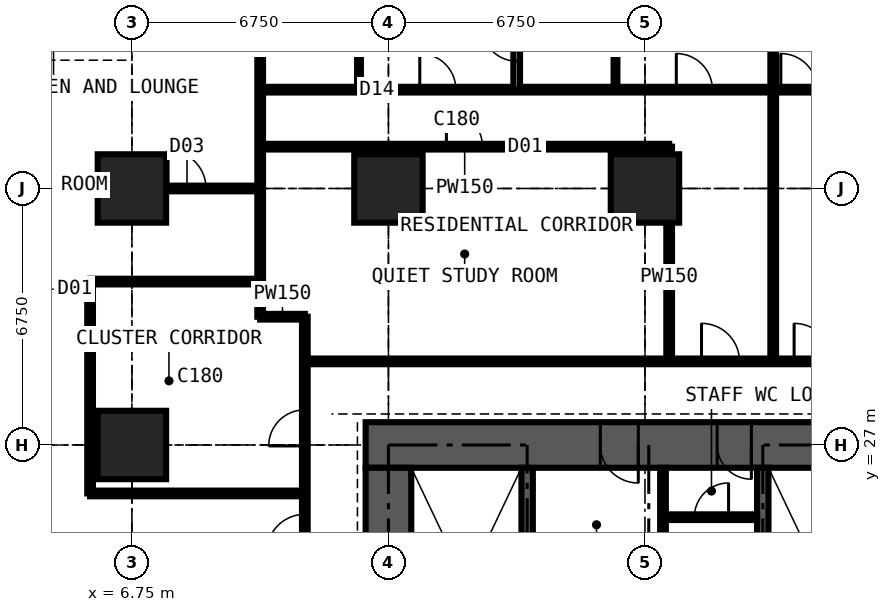
"""IFC4 building model, lengths in metres.
Left out: names, types, materials, properties, quantities, classifications, styles, units other than length and angle.
Written with IfcOpenShell. Run it as: python <this file> out.ifc"""

import sys

from ifc_helpers import new_model, si_unit, direction, frame, frame_2d, origin, origin_2d, place, context, subcontext, project, spatial, rectangle, extrude, element, fill, save


model = new_model("IFC4")
c1 = context("Model", 3, precision=1e-05, world=origin(), true_north=direction((0.0, 1.0)))
c2 = subcontext(c1, "Body", "Model", "MODEL_VIEW")
j1 = project(units=[si_unit("LENGTHUNIT", "METRE"), si_unit("PLANEANGLEUNIT", "RADIAN")], contexts=[c1])
p1 = place(None, origin())
s1 = spatial("IfcSite", under=j1, at=p1, CompositionType="ELEMENT")
p2 = place(p1, origin())
s2 = spatial("IfcBuilding", under=s1, at=p2, CompositionType="ELEMENT")
p3 = place(p2, frame((0.0, 0.0, 68.4)))
s3 = spatial("IfcBuildingStorey", under=s2, at=p3, CompositionType="ELEMENT", Elevation=68.4)
for number, where, z_axis, x_axis in (
    (1, (6.75, 27.0, 0.0), (0.0, 0.0, 1.0), (1.0, 0.0, 0.0)),
    (2, (6.75, 33.75, 0.0), (0.0, 0.0, 1.0), (1.0, 0.0, 0.0)),
    (3, (13.5, 33.75, 0.0), (0.0, 0.0, 1.0), (1.0, 0.0, 0.0)),
    (4, (20.25, 33.75, 0.0), (0.0, 0.0, 1.0), (1.0, 0.0, 0.0)),
):
    element("IfcColumn", number, at=place(p3, frame(where, z_axis=z_axis, x_axis=x_axis)), inside=s3, PredefinedType="COLUMN", context=c2, shape_type="SweptSolid", body=[
        extrude(rectangle(XDim=1.8, YDim=1.8, at=origin_2d()), origin(), (0.0, 0.0, 1.0), 3.6),
    ])
p4 = place(p3, frame((27.6, 27.0, 0.0), z_axis=(0.0, 0.0, 1.0), x_axis=(-1.0, 0.0, 0.0)))
e5 = element("IfcWall", 5, at=p4, inside=s3, PredefinedType="SHEAR", context=c2, shape_type="SweptSolid", body=[
    extrude(rectangle(XDim=14.7, YDim=1.2, at=frame_2d((7.35, 0.0))), origin(), (0.0, 0.0, 1.0), 3.6),
])
p5 = place(p4, frame((4.55, 0.0, 0.0)))
e6 = element("IfcOpeningElement", 6, at=p5, cuts=e5, PredefinedType="OPENING", context=c2, shape_type="SweptSolid", body=[
    extrude(rectangle(XDim=0.9, YDim=2.2, at=frame_2d((0.45, 1.1))), frame((0.0, 0.61, 0.0), z_axis=(0.0, -1.0, 0.0), x_axis=(1.0, 0.0, 0.0)), (0.0, 0.0, 1.0), 1.22),
])
p6 = place(p4, frame((7.525, 0.0, 0.0)))
e7 = element("IfcOpeningElement", 7, at=p6, cuts=e5, PredefinedType="OPENING", context=c2, shape_type="SweptSolid", body=[
    extrude(rectangle(XDim=1.0, YDim=2.2, at=frame_2d((0.5, 1.1))), frame((0.0, 0.61, 0.0), z_axis=(0.0, -1.0, 0.0), x_axis=(1.0, 0.0, 0.0)), (0.0, 0.0, 1.0), 1.22),
])
p7 = place(p3, frame((13.5, 26.4, 0.0), z_axis=(0.0, 0.0, 1.0), x_axis=(0.0, -1.0, 0.0)))
e8 = element("IfcWall", 8, at=p7, inside=s3, PredefinedType="SHEAR", context=c2, shape_type="SweptSolid", body=[
    extrude(rectangle(XDim=12.3, YDim=1.2, at=frame_2d((6.15, 0.0))), origin(), (0.0, 0.0, 1.0), 3.6),
])
p8 = place(p7, frame((7.45, 0.0, 0.0)))
e9 = element("IfcOpeningElement", 9, at=p8, cuts=e8, PredefinedType="OPENING", context=c2, shape_type="SweptSolid", body=[
    extrude(rectangle(XDim=1.2, YDim=2.2, at=frame_2d((0.6, 1.1))), frame((0.0, 0.61, 0.0), z_axis=(0.0, -1.0, 0.0), x_axis=(1.0, 0.0, 0.0)), (0.0, 0.0, 1.0), 1.22),
])
for number, where, z_axis, x_axis in (
    (10, (17.15, 20.3, 0.0), (0.0, 0.0, 1.0), (0.0, 1.0, 0.0)),
    (11, (23.35, 20.3, 0.0), (0.0, 0.0, 1.0), (0.0, 1.0, 0.0)),
):
    element("IfcWall", number, at=place(p3, frame(where, z_axis=z_axis, x_axis=x_axis)), inside=s3, PredefinedType="SHEAR", context=c2, shape_type="SweptSolid", body=[
        extrude(rectangle(XDim=6.1, YDim=0.3, at=frame_2d((3.05, 0.0))), origin(), (0.0, 0.0, 1.0), 3.6),
    ])
p9 = place(p3, frame((20.725, 23.4, 0.0), z_axis=(0.0, 0.0, 1.0), x_axis=(0.0, 1.0, 0.0)))
e12 = element("IfcWall", 12, at=p9, inside=s3, PredefinedType="PARTITIONING", context=c2, shape_type="SweptSolid", body=[
    extrude(rectangle(XDim=3.0, YDim=0.15, at=frame_2d((1.5, 0.0))), origin(), (0.0, 0.0, 1.0), 3.375),
])
p10 = place(p3, frame((20.8, 25.1, 0.0), z_axis=(0.0, 0.0, 1.0), x_axis=(1.0, 0.0, 0.0)))
e13 = element("IfcWall", 13, at=p10, inside=s3, PredefinedType="PARTITIONING", context=c2, shape_type="SweptSolid", body=[
    extrude(rectangle(XDim=2.4, YDim=0.15, at=frame_2d((1.2, 0.0))), origin(), (0.0, 0.0, 1.0), 3.375),
])
p11 = place(p10, frame((0.75, 0.0, 0.0)))
e14 = element("IfcOpeningElement", 14, at=p11, cuts=e13, PredefinedType="OPENING", context=c2, shape_type="SweptSolid", body=[
    extrude(rectangle(XDim=0.9, YDim=2.2, at=frame_2d((0.45, 1.1))), frame((0.0, 0.085, 0.0), z_axis=(0.0, -1.0, 0.0), x_axis=(1.0, 0.0, 0.0)), (0.0, 0.0, 1.0), 0.17),
])
p12 = place(p3, frame((-0.734, 33.75, 0.0), z_axis=(0.0, 0.0, 1.0), x_axis=(1.0, 0.0, 0.0)))
e15 = element("IfcWall", 15, at=p12, inside=s3, PredefinedType="PARTITIONING", context=c2, shape_type="SweptSolid", body=[
    extrude(rectangle(XDim=10.859, YDim=0.15, at=frame_2d((5.429, 0.0))), origin(), (0.0, 0.0, 1.0), 2.877),
])
p13 = place(p12, frame((8.434, 0.0, 0.0)))
e16 = element("IfcOpeningElement", 16, at=p13, cuts=e15, PredefinedType="OPENING", context=c2, shape_type="SweptSolid", body=[
    extrude(rectangle(XDim=1.0, YDim=2.2, at=frame_2d((0.5, 1.1))), frame((0.0, 0.085, 0.0), z_axis=(0.0, -1.0, 0.0), x_axis=(1.0, 0.0, 0.0)), (0.0, 0.0, 1.0), 0.17),
])
p14 = place(p3, frame((5.65, 25.725, 0.0), z_axis=(0.0, 0.0, 1.0), x_axis=(0.0, 1.0, 0.0)))
e17 = element("IfcWall", 17, at=p14, inside=s3, PredefinedType="PARTITIONING", context=c2, shape_type="SweptSolid", body=[
    extrude(rectangle(XDim=5.575, YDim=0.15, at=frame_2d((2.788, 0.0))), origin(), (0.0, 0.0, 1.0), 3.375),
])
p15 = place(p3, frame((5.65, 25.725, 0.0), z_axis=(0.0, 0.0, 1.0), x_axis=(1.0, 0.0, 0.0)))
e18 = element("IfcWall", 18, at=p15, inside=s3, PredefinedType="PARTITIONING", context=c2, shape_type="SweptSolid", body=[
    extrude(rectangle(XDim=5.65, YDim=0.15, at=frame_2d((2.825, 0.0))), origin(), (0.0, 0.0, 1.0), 3.375),
])
p16 = place(p3, frame((5.65, 31.3, 0.0), z_axis=(0.0, 0.0, 1.0), x_axis=(1.0, 0.0, 0.0)))
e19 = element("IfcWall", 19, at=p16, inside=s3, PredefinedType="PARTITIONING", context=c2, shape_type="SweptSolid", body=[
    extrude(rectangle(XDim=4.475, YDim=0.15, at=frame_2d((2.238, 0.0))), origin(), (0.0, 0.0, 1.0), 3.375),
])
p17 = place(p3, frame((10.125, 30.375, 0.0), z_axis=(0.0, 0.0, 1.0), x_axis=(0.0, 1.0, 0.0)))
e20 = element("IfcWall", 20, at=p17, inside=s3, PredefinedType="PARTITIONING", context=c2, shape_type="SweptSolid", body=[
    extrude(rectangle(XDim=10.859, YDim=0.15, at=frame_2d((5.429, 0.0))), origin(), (0.0, 0.0, 1.0), 3.375),
])
p18 = place(p3, frame((10.125, 30.375, 0.0), z_axis=(0.0, 0.0, 1.0), x_axis=(1.0, 0.0, 0.0)))
e21 = element("IfcWall", 21, at=p18, inside=s3, PredefinedType="PARTITIONING", context=c2, shape_type="SweptSolid", body=[
    extrude(rectangle(XDim=1.175, YDim=0.15, at=frame_2d((0.587, 0.0))), origin(), (0.0, 0.0, 1.0), 3.375),
])
p19 = place(p3, frame((10.125, 34.85, 0.0), z_axis=(0.0, 0.0, 1.0), x_axis=(1.0, 0.0, 0.0)))
e22 = element("IfcWall", 22, at=p19, inside=s3, PredefinedType="PARTITIONING", context=c2, shape_type="SweptSolid", body=[
    extrude(rectangle(XDim=10.762, YDim=0.15, at=frame_2d((5.381, 0.0))), origin(), (0.0, 0.0, 1.0), 3.375),
])
p20 = place(p19, frame((4.9, 0.0, 0.0)))
e23 = element("IfcOpeningElement", 23, at=p20, cuts=e22, PredefinedType="OPENING", context=c2, shape_type="SweptSolid", body=[
    extrude(rectangle(XDim=0.95, YDim=2.2, at=frame_2d((0.475, 1.1))), frame((0.0, 0.085, 0.0), z_axis=(0.0, -1.0, 0.0), x_axis=(1.0, 0.0, 0.0)), (0.0, 0.0, 1.0), 0.17),
])
p21 = place(p3, frame((10.125, 36.35, 0.0), z_axis=(0.0, 0.0, 1.0), x_axis=(1.0, 0.0, 0.0)))
e24 = element("IfcWall", 24, at=p21, inside=s3, PredefinedType="PARTITIONING", context=c2, shape_type="SweptSolid", body=[
    extrude(rectangle(XDim=23.625, YDim=0.15, at=frame_2d((11.812, 0.0))), origin(), (0.0, 0.0, 1.0), 3.375),
])
p22 = place(p21, frame((21.45, 0.0, 0.0)))
e25 = element("IfcOpeningElement", 25, at=p22, cuts=e24, PredefinedType="OPENING", context=c2, shape_type="SweptSolid", body=[
    extrude(rectangle(XDim=1.0, YDim=2.2, at=frame_2d((0.5, 1.1))), frame((0.0, 0.085, 0.0), z_axis=(0.0, -1.0, 0.0), x_axis=(1.0, 0.0, 0.0)), (0.0, 0.0, 1.0), 0.17),
])
p23 = place(p21, frame((17.125, 0.0, 0.0)))
e26 = element("IfcOpeningElement", 26, at=p23, cuts=e24, PredefinedType="OPENING", context=c2, shape_type="SweptSolid", body=[
    extrude(rectangle(XDim=0.95, YDim=2.2, at=frame_2d((0.475, 1.1))), frame((0.0, 0.085, 0.0), z_axis=(0.0, -1.0, 0.0), x_axis=(1.0, 0.0, 0.0)), (0.0, 0.0, 1.0), 0.17),
])
p24 = place(p21, frame((13.7, 0.0, 0.0)))
e27 = element("IfcOpeningElement", 27, at=p24, cuts=e24, PredefinedType="OPENING", context=c2, shape_type="SweptSolid", body=[
    extrude(rectangle(XDim=0.95, YDim=2.2, at=frame_2d((0.475, 1.1))), frame((0.0, 0.085, 0.0), z_axis=(0.0, -1.0, 0.0), x_axis=(1.0, 0.0, 0.0)), (0.0, 0.0, 1.0), 0.17),
])
p25 = place(p21, frame((4.2, 0.0, 0.0)))
e28 = element("IfcOpeningElement", 28, at=p25, cuts=e24, PredefinedType="OPENING", context=c2, shape_type="SweptSolid", body=[
    extrude(rectangle(XDim=0.95, YDim=2.2, at=frame_2d((0.475, 1.1))), frame((0.0, 0.085, 0.0), z_axis=(0.0, -1.0, 0.0), x_axis=(1.0, 0.0, 0.0)), (0.0, 0.0, 1.0), 0.17),
])
p26 = place(p21, frame((10.95, 0.0, 0.0)))
e29 = element("IfcOpeningElement", 29, at=p26, cuts=e24, PredefinedType="OPENING", context=c2, shape_type="SweptSolid", body=[
    extrude(rectangle(XDim=0.95, YDim=2.2, at=frame_2d((0.475, 1.1))), frame((0.0, 0.085, 0.0), z_axis=(0.0, -1.0, 0.0), x_axis=(1.0, 0.0, 0.0)), (0.0, 0.0, 1.0), 0.17),
])
p27 = place(p3, frame((11.3, 11.3, 0.0), z_axis=(0.0, 0.0, 1.0), x_axis=(0.0, 1.0, 0.0)))
e30 = element("IfcWall", 30, at=p27, inside=s3, PredefinedType="PARTITIONING", context=c2, shape_type="SweptSolid", body=[
    extrude(rectangle(XDim=19.075, YDim=0.15, at=frame_2d((9.538, 0.0))), origin(), (0.0, 0.0, 1.0), 3.375),
])
p28 = place(p27, frame((12.875, 0.0, 0.0)))
e31 = element("IfcOpeningElement", 31, at=p28, cuts=e30, PredefinedType="OPENING", context=c2, shape_type="SweptSolid", body=[
    extrude(rectangle(XDim=1.0, YDim=2.2, at=frame_2d((0.5, 1.1))), frame((0.0, 0.085, 0.0), z_axis=(0.0, -1.0, 0.0), x_axis=(1.0, 0.0, 0.0)), (0.0, 0.0, 1.0), 0.17),
])
p29 = place(p27, frame((10.438, 0.0, 0.0)))
e32 = element("IfcOpeningElement", 32, at=p29, cuts=e30, PredefinedType="OPENING", context=c2, shape_type="SweptSolid", body=[
    extrude(rectangle(XDim=1.0, YDim=2.2, at=frame_2d((0.5, 1.1))), frame((0.0, 0.085, 0.0), z_axis=(0.0, -1.0, 0.0), x_axis=(1.0, 0.0, 0.0)), (0.0, 0.0, 1.0), 0.17),
])
p30 = place(p27, frame((15.675, 0.0, 0.0)))
e33 = element("IfcOpeningElement", 33, at=p30, cuts=e30, PredefinedType="OPENING", context=c2, shape_type="SweptSolid", body=[
    extrude(rectangle(XDim=0.95, YDim=2.2, at=frame_2d((0.475, 1.1))), frame((0.0, 0.085, 0.0), z_axis=(0.0, -1.0, 0.0), x_axis=(1.0, 0.0, 0.0)), (0.0, 0.0, 1.0), 0.17),
])
p31 = place(p3, frame((11.3, 29.2, 0.0), z_axis=(0.0, 0.0, 1.0), x_axis=(1.0, 0.0, 0.0)))
e34 = element("IfcWall", 34, at=p31, inside=s3, PredefinedType="PARTITIONING", context=c2, shape_type="SweptSolid", body=[
    extrude(rectangle(XDim=19.075, YDim=0.15, at=frame_2d((9.538, 0.0))), origin(), (0.0, 0.0, 1.0), 3.375),
])
p32 = place(p31, frame((12.875, 0.0, 0.0)))
e35 = element("IfcOpeningElement", 35, at=p32, cuts=e34, PredefinedType="OPENING", context=c2, shape_type="SweptSolid", body=[
    extrude(rectangle(XDim=1.0, YDim=2.2, at=frame_2d((0.5, 1.1))), frame((0.0, 0.085, 0.0), z_axis=(0.0, -1.0, 0.0), x_axis=(1.0, 0.0, 0.0)), (0.0, 0.0, 1.0), 0.17),
])
p33 = place(p31, frame((10.438, 0.0, 0.0)))
e36 = element("IfcOpeningElement", 36, at=p33, cuts=e34, PredefinedType="OPENING", context=c2, shape_type="SweptSolid", body=[
    extrude(rectangle(XDim=1.0, YDim=2.2, at=frame_2d((0.5, 1.1))), frame((0.0, 0.085, 0.0), z_axis=(0.0, -1.0, 0.0), x_axis=(1.0, 0.0, 0.0)), (0.0, 0.0, 1.0), 0.17),
])
p34 = place(p31, frame((14.875, 0.0, 0.0)))
e37 = element("IfcOpeningElement", 37, at=p34, cuts=e34, PredefinedType="OPENING", context=c2, shape_type="SweptSolid", body=[
    extrude(rectangle(XDim=0.95, YDim=2.2, at=frame_2d((0.475, 1.1))), frame((0.0, 0.085, 0.0), z_axis=(0.0, -1.0, 0.0), x_axis=(1.0, 0.0, 0.0)), (0.0, 0.0, 1.0), 0.17),
])
p35 = place(p3, frame((12.725, 36.35, 0.0), z_axis=(0.0, 0.0, 1.0), x_axis=(0.0, 1.0, 0.0)))
e38 = element("IfcWall", 38, at=p35, inside=s3, PredefinedType="PARTITIONING", context=c2, shape_type="SweptSolid", body=[
    extrude(rectangle(XDim=2.4, YDim=0.1, at=frame_2d((1.2, 0.0))), origin(), (0.0, 0.0, 1.0), 3.375),
])
p36 = place(p3, frame((16.875, 36.35, 0.0), z_axis=(0.0, 0.0, 1.0), x_axis=(0.0, 1.0, 0.0)))
e39 = element("IfcWall", 39, at=p36, inside=s3, PredefinedType="PARTITIONING", context=c2, shape_type="SweptSolid", body=[
    extrude(rectangle(XDim=4.884, YDim=0.175, at=frame_2d((2.442, 0.0))), origin(), (0.0, 0.0, 1.0), 3.375),
])
p37 = place(p36, frame((0.75, 0.0, 0.0)))
e40 = element("IfcOpeningElement", 40, at=p37, cuts=e39, PredefinedType="OPENING", context=c2, shape_type="SweptSolid", body=[
    extrude(rectangle(XDim=0.9, YDim=2.2, at=frame_2d((0.45, 1.1))), frame((0.0, 0.097, 0.0), z_axis=(0.0, -1.0, 0.0), x_axis=(1.0, 0.0, 0.0)), (0.0, 0.0, 1.0), 0.195),
])
p38 = place(p3, frame((19.475, 36.35, 0.0), z_axis=(0.0, 0.0, 1.0), x_axis=(0.0, 1.0, 0.0)))
e41 = element("IfcWall", 41, at=p38, inside=s3, PredefinedType="PARTITIONING", context=c2, shape_type="SweptSolid", body=[
    extrude(rectangle(XDim=2.4, YDim=0.1, at=frame_2d((1.2, 0.0))), origin(), (0.0, 0.0, 1.0), 3.375),
])
p39 = place(p3, frame((20.887, 29.2, 0.0), z_axis=(0.0, 0.0, 1.0), x_axis=(0.0, 1.0, 0.0)))
e42 = element("IfcWall", 42, at=p39, inside=s3, PredefinedType="PARTITIONING", context=c2, shape_type="SweptSolid", body=[
    extrude(rectangle(XDim=5.65, YDim=0.15, at=frame_2d((2.825, 0.0))), origin(), (0.0, 0.0, 1.0), 3.375),
])
p40 = place(p3, frame((23.625, 29.2, 0.0), z_axis=(0.0, 0.0, 1.0), x_axis=(0.0, 1.0, 0.0)))
e43 = element("IfcWall", 43, at=p40, inside=s3, PredefinedType="PARTITIONING", context=c2, shape_type="SweptSolid", body=[
    extrude(rectangle(XDim=12.034, YDim=0.15, at=frame_2d((6.017, 0.0))), origin(), (0.0, 0.0, 1.0), 3.375),
])
p41 = place(p11, origin())
e44 = element("IfcDoor", 44, at=p41, inside=s3, OperationType="SINGLE_SWING_RIGHT", PredefinedType="DOOR", context=c2, shape_type="SweptSolid", body=[
    extrude(rectangle(XDim=0.9, YDim=2.2, at=frame_2d((0.45, 1.1))), frame((0.0, 0.025, 0.0), z_axis=(0.0, -1.0, 0.0), x_axis=(1.0, 0.0, 0.0)), (0.0, 0.0, 1.0), 0.05),
])
fill(e14, e44)
p42 = place(p5, origin())
e45 = element("IfcDoor", 45, at=p42, inside=s3, OperationType="SINGLE_SWING_LEFT", PredefinedType="DOOR", context=c2, shape_type="SweptSolid", body=[
    extrude(rectangle(XDim=0.9, YDim=2.2, at=frame_2d((0.45, 1.1))), frame((0.0, 0.4, 0.0), z_axis=(0.0, -1.0, 0.0), x_axis=(1.0, 0.0, 0.0)), (0.0, 0.0, 1.0), 0.8),
])
fill(e6, e45)
p43 = place(p6, origin())
e46 = element("IfcDoor", 46, at=p43, inside=s3, OperationType="SINGLE_SWING_LEFT", PredefinedType="DOOR", context=c2, shape_type="SweptSolid", body=[
    extrude(rectangle(XDim=1.0, YDim=2.2, at=frame_2d((0.5, 1.1))), frame((0.0, 0.025, 0.0), z_axis=(0.0, -1.0, 0.0), x_axis=(1.0, 0.0, 0.0)), (0.0, 0.0, 1.0), 0.05),
])
fill(e7, e46)
p44 = place(p24, origin())
e47 = element("IfcDoor", 47, at=p44, inside=s3, OperationType="SINGLE_SWING_LEFT", PredefinedType="DOOR", context=c2, shape_type="SweptSolid", body=[
    extrude(rectangle(XDim=0.95, YDim=2.2, at=frame_2d((0.475, 1.1))), frame((0.0, 0.025, 0.0), z_axis=(0.0, -1.0, 0.0), x_axis=(1.0, 0.0, 0.0)), (0.0, 0.0, 1.0), 0.05),
])
fill(e27, e47)
p45 = place(p32, origin())
e48 = element("IfcDoor", 48, at=p45, inside=s3, OperationType="SINGLE_SWING_LEFT", PredefinedType="DOOR", context=c2, shape_type="SweptSolid", body=[
    extrude(rectangle(XDim=1.0, YDim=2.2, at=frame_2d((0.5, 1.1))), frame((0.0, 0.025, 0.0), z_axis=(0.0, -1.0, 0.0), x_axis=(1.0, 0.0, 0.0)), (0.0, 0.0, 1.0), 0.05),
])
fill(e35, e48)
p46 = place(p25, origin())
e49 = element("IfcDoor", 49, at=p46, inside=s3, OperationType="SINGLE_SWING_LEFT", PredefinedType="DOOR", context=c2, shape_type="SweptSolid", body=[
    extrude(rectangle(XDim=0.95, YDim=2.2, at=frame_2d((0.475, 1.1))), frame((0.0, 0.025, 0.0), z_axis=(0.0, -1.0, 0.0), x_axis=(1.0, 0.0, 0.0)), (0.0, 0.0, 1.0), 0.05),
])
fill(e28, e49)
p47 = place(p26, origin())
e50 = element("IfcDoor", 50, at=p47, inside=s3, OperationType="SINGLE_SWING_LEFT", PredefinedType="DOOR", context=c2, shape_type="SweptSolid", body=[
    extrude(rectangle(XDim=0.95, YDim=2.2, at=frame_2d((0.475, 1.1))), frame((0.0, 0.025, 0.0), z_axis=(0.0, -1.0, 0.0), x_axis=(1.0, 0.0, 0.0)), (0.0, 0.0, 1.0), 0.05),
])
fill(e29, e50)
p48 = place(p37, origin())
e51 = element("IfcDoor", 51, at=p48, inside=s3, OperationType="SINGLE_SWING_RIGHT", PredefinedType="DOOR", context=c2, shape_type="SweptSolid", body=[
    extrude(rectangle(XDim=0.9, YDim=2.2, at=frame_2d((0.45, 1.1))), frame((0.0, 0.025, 0.0), z_axis=(0.0, -1.0, 0.0), x_axis=(1.0, 0.0, 0.0)), (0.0, 0.0, 1.0), 0.05),
])
fill(e40, e51)
p49 = place(p33, origin())
e52 = element("IfcDoor", 52, at=p49, inside=s3, OperationType="SINGLE_SWING_LEFT", PredefinedType="DOOR", context=c2, shape_type="SweptSolid", body=[
    extrude(rectangle(XDim=1.0, YDim=2.2, at=frame_2d((0.5, 1.1))), frame((0.0, 0.025, 0.0), z_axis=(0.0, -1.0, 0.0), x_axis=(1.0, 0.0, 0.0)), (0.0, 0.0, 1.0), 0.05),
])
fill(e36, e52)
p50 = place(p20, origin())
e53 = element("IfcDoor", 53, at=p50, inside=s3, OperationType="SINGLE_SWING_LEFT", PredefinedType="DOOR", context=c2, shape_type="SweptSolid", body=[
    extrude(rectangle(XDim=0.95, YDim=2.2, at=frame_2d((0.475, 1.1))), frame((0.0, 0.025, 0.0), z_axis=(0.0, -1.0, 0.0), x_axis=(1.0, 0.0, 0.0)), (0.0, 0.0, 1.0), 0.05),
])
fill(e23, e53)
p51 = place(p13, origin())
e54 = element("IfcDoor", 54, at=p51, inside=s3, OperationType="SINGLE_SWING_LEFT", PredefinedType="DOOR", context=c2, shape_type="SweptSolid", body=[
    extrude(rectangle(XDim=1.0, YDim=2.2, at=frame_2d((0.5, 1.1))), frame((0.0, 0.025, 0.0), z_axis=(0.0, -1.0, 0.0), x_axis=(1.0, 0.0, 0.0)), (0.0, 0.0, 1.0), 0.05),
])
fill(e16, e54)
p52 = place(p28, origin())
e55 = element("IfcDoor", 55, at=p52, inside=s3, OperationType="SINGLE_SWING_LEFT", PredefinedType="DOOR", context=c2, shape_type="SweptSolid", body=[
    extrude(rectangle(XDim=1.0, YDim=2.2, at=frame_2d((0.5, 1.1))), frame((0.0, 0.025, 0.0), z_axis=(0.0, -1.0, 0.0), x_axis=(1.0, 0.0, 0.0)), (0.0, 0.0, 1.0), 0.05),
])
fill(e31, e55)
p53 = place(p30, origin())
e56 = element("IfcDoor", 56, at=p53, inside=s3, OperationType="SINGLE_SWING_LEFT", PredefinedType="DOOR", context=c2, shape_type="SweptSolid", body=[
    extrude(rectangle(XDim=0.95, YDim=2.2, at=frame_2d((0.475, 1.1))), frame((0.0, 0.025, 0.0), z_axis=(0.0, -1.0, 0.0), x_axis=(1.0, 0.0, 0.0)), (0.0, 0.0, 1.0), 0.05),
])
fill(e33, e56)
save(model, sys.argv[1])
